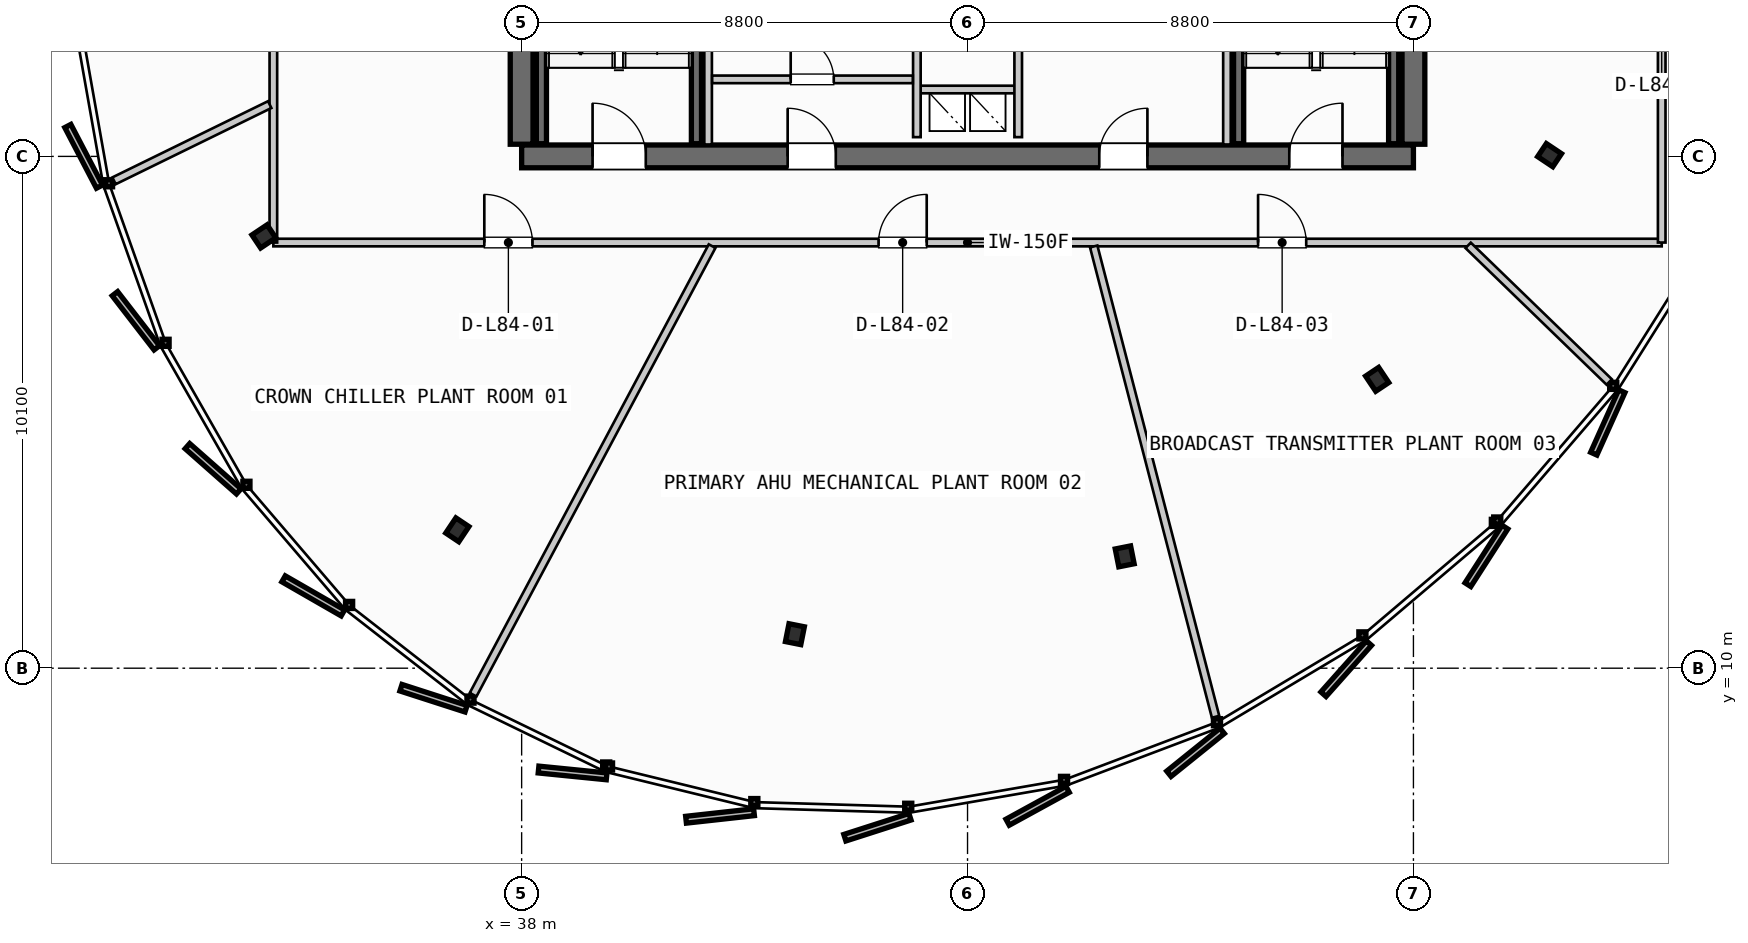
"""IFC4 building model, lengths in metres.
Left out: names, types, materials, properties, quantities, classifications, styles, units other than length and angle.
Written with IfcOpenShell. Run it as: python <this file> out.ifc"""

import sys

from ifc_helpers import new_model, si_unit, direction, frame, frame_2d, origin, origin_2d, place, context, subcontext, project, spatial, rectangle, i_section, extrude, source, transform, mapped, element, fill, save


model = new_model("IFC4")
c1 = context("Model", 3, precision=1e-05, world=origin(), true_north=direction((0.0, 1.0)))
c2 = subcontext(c1, "Body", "Model", "MODEL_VIEW")
j1 = project(units=[si_unit("LENGTHUNIT", "METRE"), si_unit("PLANEANGLEUNIT", "RADIAN")], contexts=[c1])
p1 = place(None, origin())
s1 = spatial("IfcSite", under=j1, at=p1, CompositionType="ELEMENT")
p2 = place(p1, origin())
s2 = spatial("IfcBuilding", under=s1, at=p2, CompositionType="ELEMENT")
p3 = place(p2, frame((0.0, 0.0, 316.3)))
s3 = spatial("IfcBuildingStorey", under=s2, at=p3, CompositionType="ELEMENT", Elevation=316.3)
p4 = place(p3, frame((38.0, 20.1, 0.0), z_axis=(0.0, 0.0, 1.0), x_axis=(1.0, 0.0, 0.0)))
e1 = element("IfcWall", 1, at=p4, inside=s3, PredefinedType="SHEAR", context=c2, shape_type="SweptSolid", body=[
    extrude(rectangle(XDim=17.6, YDim=0.45, at=frame_2d((8.8, 0.0))), origin(), (0.0, 0.0, 1.0), 3.735),
])
p5 = place(p4, frame((1.4, 0.0, 0.0)))
e2 = element("IfcOpeningElement", 2, at=p5, cuts=e1, PredefinedType="OPENING", context=c2, shape_type="SweptSolid", body=[
    extrude(rectangle(XDim=1.05, YDim=2.15, at=frame_2d((0.525, 1.075))), frame((0.0, 0.235, 0.0), z_axis=(0.0, -1.0, 0.0), x_axis=(1.0, 0.0, 0.0)), (0.0, 0.0, 1.0), 0.47),
])
p6 = place(p4, frame((15.15, 0.0, 0.0)))
e3 = element("IfcOpeningElement", 3, at=p6, cuts=e1, PredefinedType="OPENING", context=c2, shape_type="SweptSolid", body=[
    extrude(rectangle(XDim=1.05, YDim=2.15, at=frame_2d((0.525, 1.075))), frame((0.0, 0.235, 0.0), z_axis=(0.0, -1.0, 0.0), x_axis=(1.0, 0.0, 0.0)), (0.0, 0.0, 1.0), 0.47),
])
p7 = place(p4, frame((5.25, 0.0, 0.0)))
e4 = element("IfcOpeningElement", 4, at=p7, cuts=e1, PredefinedType="OPENING", context=c2, shape_type="SweptSolid", body=[
    extrude(rectangle(XDim=0.95, YDim=2.15, at=frame_2d((0.475, 1.075))), frame((0.0, 0.235, 0.0), z_axis=(0.0, -1.0, 0.0), x_axis=(1.0, 0.0, 0.0)), (0.0, 0.0, 1.0), 0.47),
])
p8 = place(p4, frame((11.4, 0.0, 0.0)))
e5 = element("IfcOpeningElement", 5, at=p8, cuts=e1, PredefinedType="OPENING", context=c2, shape_type="SweptSolid", body=[
    extrude(rectangle(XDim=0.95, YDim=2.15, at=frame_2d((0.475, 1.075))), frame((0.0, 0.235, 0.0), z_axis=(0.0, -1.0, 0.0), x_axis=(1.0, 0.0, 0.0)), (0.0, 0.0, 1.0), 0.47),
])
p9 = place(p3, frame((38.0, 35.26, 0.0), z_axis=(0.0, 0.0, 1.0), x_axis=(0.0, -1.0, 0.0)))
e6 = element("IfcWall", 6, at=p9, inside=s3, PredefinedType="SHEAR", context=c2, shape_type="SweptSolid", body=[
    extrude(rectangle(XDim=14.92, YDim=0.45, at=frame_2d((7.46, 0.0))), origin(), (0.0, 0.0, 1.0), 3.735),
])
p10 = place(p9, frame((5.21, 0.0, 0.0)))
e7 = element("IfcOpeningElement", 7, at=p10, cuts=e6, PredefinedType="OPENING", context=c2, shape_type="SweptSolid", body=[
    extrude(rectangle(XDim=1.1, YDim=2.2, at=frame_2d((0.55, 1.1))), frame((0.0, 0.235, 0.0), z_axis=(0.0, -1.0, 0.0), x_axis=(1.0, 0.0, 0.0)), (0.0, 0.0, 1.0), 0.47),
])
p11 = place(p3, frame((55.6, 20.34, 0.0), z_axis=(0.0, 0.0, 1.0), x_axis=(0.0, 1.0, 0.0)))
e8 = element("IfcWall", 8, at=p11, inside=s3, PredefinedType="SHEAR", context=c2, shape_type="SweptSolid", body=[
    extrude(rectangle(XDim=14.92, YDim=0.45, at=frame_2d((7.46, 0.0))), origin(), (0.0, 0.0, 1.0), 3.735),
])
p12 = place(p11, frame((12.71, 0.0, 0.0)))
e9 = element("IfcOpeningElement", 9, at=p12, cuts=e8, PredefinedType="OPENING", context=c2, shape_type="SweptSolid", body=[
    extrude(rectangle(XDim=1.05, YDim=2.15, at=frame_2d((0.525, 1.075))), frame((0.0, 0.235, 0.0), z_axis=(0.0, -1.0, 0.0), x_axis=(1.0, 0.0, 0.0)), (0.0, 0.0, 1.0), 0.47),
])
p13 = place(p11, frame((8.61, 0.0, 0.0)))
e10 = element("IfcOpeningElement", 10, at=p13, cuts=e8, PredefinedType="OPENING", context=c2, shape_type="SweptSolid", body=[
    extrude(rectangle(XDim=1.1, YDim=2.2, at=frame_2d((0.55, 1.1))), frame((0.0, 0.235, 0.0), z_axis=(0.0, -1.0, 0.0), x_axis=(1.0, 0.0, 0.0)), (0.0, 0.0, 1.0), 0.47),
])
m1 = source(origin(), c2, "Body", "SweptSolid", [
    extrude(i_section(OverallWidth=0.309, OverallDepth=0.359, WebThickness=0.016, FlangeThickness=0.026, FilletRadius=0.027, at=origin_2d()), origin(), (0.0, 0.0, 1.0), 3.735),
])
for number, where, z_axis, x_axis in (
    (11, (32.913, 18.521, 0.0), (0.0, 0.0, 1.0), (-0.831, -0.556, 0.0)),
    (12, (36.731, 12.731, 0.0), (0.0, 0.0, 1.0), (-0.556, -0.831, 0.0)),
    (13, (43.393, 10.671, 0.0), (0.0, 0.0, 1.0), (-0.195, -0.981, 0.0)),
    (14, (49.902, 12.207, 0.0), (0.0, 0.0, 1.0), (0.195, -0.981, 0.0)),
    (15, (54.885, 15.7, 0.0), (0.0, 0.0, 1.0), (0.556, -0.831, 0.0)),
    (16, (58.287, 20.125, 0.0), (0.0, 0.0, 1.0), (0.831, -0.556, 0.0)),
):
    element("IfcColumn", number, at=place(p3, frame(where, z_axis=z_axis, x_axis=x_axis)), inside=s3, PredefinedType="COLUMN", context=c2, shape_type="MappedRepresentation", body=[
        mapped(m1, transform((0.0, 0.0, 0.0), scale=1.0)),
    ])
for number, where, z_axis, x_axis in (
    (17, (41.45, 27.7, 0.0), (0.0, 0.0, 1.0), (0.0, -1.0, 0.0)),
    (18, (38.39, 20.35, 0.0), (0.0, 0.0, 1.0), (0.0, 1.0, 0.0)),
    (19, (55.21, 27.7, 0.0), (0.0, 0.0, 1.0), (0.0, -1.0, 0.0)),
    (20, (52.15, 20.35, 0.0), (0.0, 0.0, 1.0), (0.0, 1.0, 0.0)),
):
    element("IfcWall", number, at=place(p3, frame(where, z_axis=z_axis, x_axis=x_axis)), inside=s3, PredefinedType="SHEAR", context=c2, shape_type="SweptSolid", body=[
        extrude(rectangle(XDim=7.35, YDim=0.2, at=frame_2d((3.675, 0.0))), origin(), (0.0, 0.0, 1.0), 3.735),
    ])
p14 = place(p3, frame((45.8, 21.42, 0.0), z_axis=(0.0, 0.0, 1.0), x_axis=(1.0, 0.0, 0.0)))
e21 = element("IfcWall", 21, at=p14, inside=s3, PredefinedType="PARTITIONING", context=c2, shape_type="SweptSolid", body=[
    extrude(rectangle(XDim=2.0, YDim=0.15, at=frame_2d((1.0, 0.0))), origin(), (0.0, 0.0, 1.0), 3.26),
])
for number, where, z_axis, x_axis in (
    (22, (45.8, 20.48, 0.0), (0.0, 0.0, 1.0), (0.0, 1.0, 0.0)),
    (23, (47.8, 20.48, 0.0), (0.0, 0.0, 1.0), (0.0, 1.0, 0.0)),
):
    element("IfcWall", number, at=place(p3, frame(where, z_axis=z_axis, x_axis=x_axis)), inside=s3, PredefinedType="PARTITIONING", context=c2, shape_type="SweptSolid", body=[
        extrude(rectangle(XDim=2.24, YDim=0.15, at=frame_2d((1.12, 0.0))), origin(), (0.0, 0.0, 1.0), 3.26),
    ])
for number, where, z_axis, x_axis in (
    (24, (41.68, 20.335, 0.0), (0.0, 0.0, 1.0), (0.0, 1.0, 0.0)),
    (25, (51.92, 20.335, 0.0), (0.0, 0.0, 1.0), (0.0, 1.0, 0.0)),
):
    element("IfcWall", number, at=place(p3, frame(where, z_axis=z_axis, x_axis=x_axis)), inside=s3, PredefinedType="PARTITIONING", context=c2, shape_type="SweptSolid", body=[
        extrude(rectangle(XDim=2.395, YDim=0.15, at=frame_2d((1.198, 0.0))), origin(), (0.0, 0.0, 1.0), 3.26),
    ])
p15 = place(p3, frame((41.76, 21.62, 0.0), z_axis=(0.0, 0.0, 1.0), x_axis=(1.0, 0.0, 0.0)))
e26 = element("IfcWall", 26, at=p15, inside=s3, PredefinedType="PARTITIONING", context=c2, shape_type="SweptSolid", body=[
    extrude(rectangle(XDim=3.96, YDim=0.15, at=frame_2d((1.98, 0.0))), origin(), (0.0, 0.0, 1.0), 3.26),
])
p16 = place(p15, frame((1.55, 0.0, 0.0)))
e27 = element("IfcOpeningElement", 27, at=p16, cuts=e26, PredefinedType="OPENING", context=c2, shape_type="SweptSolid", body=[
    extrude(rectangle(XDim=0.85, YDim=2.15, at=frame_2d((0.425, 1.075))), frame((0.0, 0.085, 0.0), z_axis=(0.0, -1.0, 0.0), x_axis=(1.0, 0.0, 0.0)), (0.0, 0.0, 1.0), 0.17),
])
p17 = place(p3, frame((33.1, 18.4, 0.0), z_axis=(0.0, 0.0, 1.0), x_axis=(1.0, 0.0, 0.0)))
e28 = element("IfcWall", 28, at=p17, inside=s3, PredefinedType="PARTITIONING", context=c2, shape_type="SweptSolid", body=[
    extrude(rectangle(XDim=27.4, YDim=0.15, at=frame_2d((13.7, 0.0))), origin(), (0.0, 0.0, 1.0), 3.26),
])
p18 = place(p17, frame((4.163, 0.0, 0.0)))
e29 = element("IfcOpeningElement", 29, at=p18, cuts=e28, PredefinedType="OPENING", context=c2, shape_type="SweptSolid", body=[
    extrude(rectangle(XDim=0.95, YDim=2.15, at=frame_2d((0.475, 1.075))), frame((0.0, 0.085, 0.0), z_axis=(0.0, -1.0, 0.0), x_axis=(1.0, 0.0, 0.0)), (0.0, 0.0, 1.0), 0.17),
])
p19 = place(p17, frame((11.945, 0.0, 0.0)))
e30 = element("IfcOpeningElement", 30, at=p19, cuts=e28, PredefinedType="OPENING", context=c2, shape_type="SweptSolid", body=[
    extrude(rectangle(XDim=0.95, YDim=2.15, at=frame_2d((0.475, 1.075))), frame((0.0, 0.085, 0.0), z_axis=(0.0, -1.0, 0.0), x_axis=(1.0, 0.0, 0.0)), (0.0, 0.0, 1.0), 0.17),
])
p20 = place(p17, frame((19.434, 0.0, 0.0)))
e31 = element("IfcOpeningElement", 31, at=p20, cuts=e28, PredefinedType="OPENING", context=c2, shape_type="SweptSolid", body=[
    extrude(rectangle(XDim=0.95, YDim=2.15, at=frame_2d((0.475, 1.075))), frame((0.0, 0.085, 0.0), z_axis=(0.0, -1.0, 0.0), x_axis=(1.0, 0.0, 0.0)), (0.0, 0.0, 1.0), 0.17),
])
p21 = place(p3, frame((60.5, 18.4, 0.0), z_axis=(0.0, 0.0, 1.0), x_axis=(0.0, 1.0, 0.0)))
e32 = element("IfcWall", 32, at=p21, inside=s3, PredefinedType="PARTITIONING", context=c2, shape_type="SweptSolid", body=[
    extrude(rectangle(XDim=18.8, YDim=0.15, at=frame_2d((9.4, 0.0))), origin(), (0.0, 0.0, 1.0), 3.26),
])
p22 = place(p21, frame((4.269, 0.0, 0.0)))
e33 = element("IfcOpeningElement", 33, at=p22, cuts=e32, PredefinedType="OPENING", context=c2, shape_type="SweptSolid", body=[
    extrude(rectangle(XDim=0.95, YDim=2.15, at=frame_2d((0.475, 1.075))), frame((0.0, 0.085, 0.0), z_axis=(0.0, -1.0, 0.0), x_axis=(1.0, 0.0, 0.0)), (0.0, 0.0, 1.0), 0.17),
])
p23 = place(p21, frame((13.889, 0.0, 0.0)))
e34 = element("IfcOpeningElement", 34, at=p23, cuts=e32, PredefinedType="OPENING", context=c2, shape_type="SweptSolid", body=[
    extrude(rectangle(XDim=0.95, YDim=2.15, at=frame_2d((0.475, 1.075))), frame((0.0, 0.085, 0.0), z_axis=(0.0, -1.0, 0.0), x_axis=(1.0, 0.0, 0.0)), (0.0, 0.0, 1.0), 0.17),
])
p24 = place(p3, frame((33.1, 37.2, 0.0), z_axis=(0.0, 0.0, 1.0), x_axis=(0.0, -1.0, 0.0)))
e35 = element("IfcWall", 35, at=p24, inside=s3, PredefinedType="PARTITIONING", context=c2, shape_type="SweptSolid", body=[
    extrude(rectangle(XDim=18.8, YDim=0.15, at=frame_2d((9.4, 0.0))), origin(), (0.0, 0.0, 1.0), 3.26),
])
p25 = place(p24, frame((3.594, 0.0, 0.0)))
e36 = element("IfcOpeningElement", 36, at=p25, cuts=e35, PredefinedType="OPENING", context=c2, shape_type="SweptSolid", body=[
    extrude(rectangle(XDim=0.95, YDim=2.15, at=frame_2d((0.475, 1.075))), frame((0.0, 0.085, 0.0), z_axis=(0.0, -1.0, 0.0), x_axis=(1.0, 0.0, 0.0)), (0.0, 0.0, 1.0), 0.17),
])
p26 = place(p24, frame((10.939, 0.0, 0.0)))
e37 = element("IfcOpeningElement", 37, at=p26, cuts=e35, PredefinedType="OPENING", context=c2, shape_type="SweptSolid", body=[
    extrude(rectangle(XDim=0.95, YDim=2.15, at=frame_2d((0.475, 1.075))), frame((0.0, 0.085, 0.0), z_axis=(0.0, -1.0, 0.0), x_axis=(1.0, 0.0, 0.0)), (0.0, 0.0, 1.0), 0.17),
])
p27 = place(p3, frame((33.028, 21.122, 0.0), z_axis=(0.0, 0.0, 1.0), x_axis=(-0.898192137988, -0.439603097415, 0.0)))
e38 = element("IfcWall", 38, at=p27, inside=s3, PredefinedType="PARTITIONING", context=c2, shape_type="SweptSolid", body=[
    extrude(rectangle(XDim=3.42, YDim=0.15, at=frame_2d((1.71, 0.0))), origin(), (0.0, 0.0, 1.0), 3.26),
])
p28 = place(p3, frame((41.759, 18.329, 0.0), z_axis=(0.0, 0.0, 1.0), x_axis=(-0.470244579164, -0.882536138505, 0.0)))
e39 = element("IfcWall", 39, at=p28, inside=s3, PredefinedType="PARTITIONING", context=c2, shape_type="SweptSolid", body=[
    extrude(rectangle(XDim=10.031, YDim=0.15, at=frame_2d((5.015, 0.0))), origin(), (0.0, 0.0, 1.0), 3.26),
])
p29 = place(p3, frame((49.29, 18.323, 0.0), z_axis=(0.0, 0.0, 1.0), x_axis=(0.250860534884, -0.96802323941, 0.0)))
e40 = element("IfcWall", 40, at=p29, inside=s3, PredefinedType="PARTITIONING", context=c2, shape_type="SweptSolid", body=[
    extrude(rectangle(XDim=9.588, YDim=0.15, at=frame_2d((4.794, 0.0))), origin(), (0.0, 0.0, 1.0), 3.26),
])
p30 = place(p3, frame((56.68, 18.344, 0.0), z_axis=(0.0, 0.0, 1.0), x_axis=(0.718355321418, -0.695676384672, 0.0)))
e41 = element("IfcWall", 41, at=p30, inside=s3, PredefinedType="PARTITIONING", context=c2, shape_type="SweptSolid", body=[
    extrude(rectangle(XDim=3.875, YDim=0.15, at=frame_2d((1.938, 0.0))), origin(), (0.0, 0.0, 1.0), 3.26),
])
m2 = source(origin(), c2, "Body", "SweptSolid", [
    extrude(rectangle(XDim=1.05, YDim=2.15, at=frame_2d((0.525, 1.075))), frame((0.0, 0.025, 0.0), z_axis=(0.0, -1.0, 0.0), x_axis=(1.0, 0.0, 0.0)), (0.0, 0.0, 1.0), 0.05),
])
p31 = place(p5, origin())
e42 = element("IfcDoor", 42, at=p31, inside=s3, OperationType="SINGLE_SWING_LEFT", PredefinedType="DOOR", context=c2, shape_type="MappedRepresentation", body=[
    mapped(m2, transform((0.0, 0.0, 0.0), scale=1.0)),
])
fill(e2, e42)
p32 = place(p6, origin())
e43 = element("IfcDoor", 43, at=p32, inside=s3, OperationType="SINGLE_SWING_RIGHT", PredefinedType="DOOR", context=c2, shape_type="MappedRepresentation", body=[
    mapped(m2, transform((0.0, 0.0, 0.0), scale=1.0)),
])
fill(e3, e43)
m3 = source(origin(), c2, "Body", "SweptSolid", [
    extrude(rectangle(XDim=0.95, YDim=2.15, at=frame_2d((0.475, 1.075))), frame((0.0, 0.025, 0.0), z_axis=(0.0, -1.0, 0.0), x_axis=(1.0, 0.0, 0.0)), (0.0, 0.0, 1.0), 0.05),
])
p33 = place(p7, origin())
e44 = element("IfcDoor", 44, at=p33, inside=s3, OperationType="SINGLE_SWING_LEFT", PredefinedType="DOOR", context=c2, shape_type="MappedRepresentation", body=[
    mapped(m3, transform((0.0, 0.0, 0.0), scale=1.0)),
])
fill(e4, e44)
p34 = place(p8, origin())
e45 = element("IfcDoor", 45, at=p34, inside=s3, OperationType="SINGLE_SWING_RIGHT", PredefinedType="DOOR", context=c2, shape_type="MappedRepresentation", body=[
    mapped(m3, transform((0.0, 0.0, 0.0), scale=1.0)),
])
fill(e5, e45)
m4 = source(origin(), c2, "Body", "SweptSolid", [
    extrude(rectangle(XDim=0.85, YDim=2.15, at=frame_2d((0.425, 1.075))), frame((0.0, 0.025, 0.0), z_axis=(0.0, -1.0, 0.0), x_axis=(1.0, 0.0, 0.0)), (0.0, 0.0, 1.0), 0.05),
])
p35 = place(p16, origin())
e46 = element("IfcDoor", 46, at=p35, inside=s3, OperationType="SINGLE_SWING_LEFT", PredefinedType="DOOR", context=c2, shape_type="MappedRepresentation", body=[
    mapped(m4, transform((0.0, 0.0, 0.0), scale=1.0)),
])
fill(e27, e46)
p36 = place(p18, origin())
e47 = element("IfcDoor", 47, at=p36, inside=s3, OperationType="SINGLE_SWING_LEFT", PredefinedType="DOOR", context=c2, shape_type="MappedRepresentation", body=[
    mapped(m3, transform((0.0, 0.0, 0.0), scale=1.0)),
])
fill(e29, e47)
p37 = place(p19, origin())
e48 = element("IfcDoor", 48, at=p37, inside=s3, OperationType="SINGLE_SWING_RIGHT", PredefinedType="DOOR", context=c2, shape_type="MappedRepresentation", body=[
    mapped(m3, transform((0.0, 0.0, 0.0), scale=1.0)),
])
fill(e30, e48)
p38 = place(p20, origin())
e49 = element("IfcDoor", 49, at=p38, inside=s3, OperationType="SINGLE_SWING_LEFT", PredefinedType="DOOR", context=c2, shape_type="MappedRepresentation", body=[
    mapped(m3, transform((0.0, 0.0, 0.0), scale=1.0)),
])
fill(e31, e49)
save(model, sys.argv[1])
